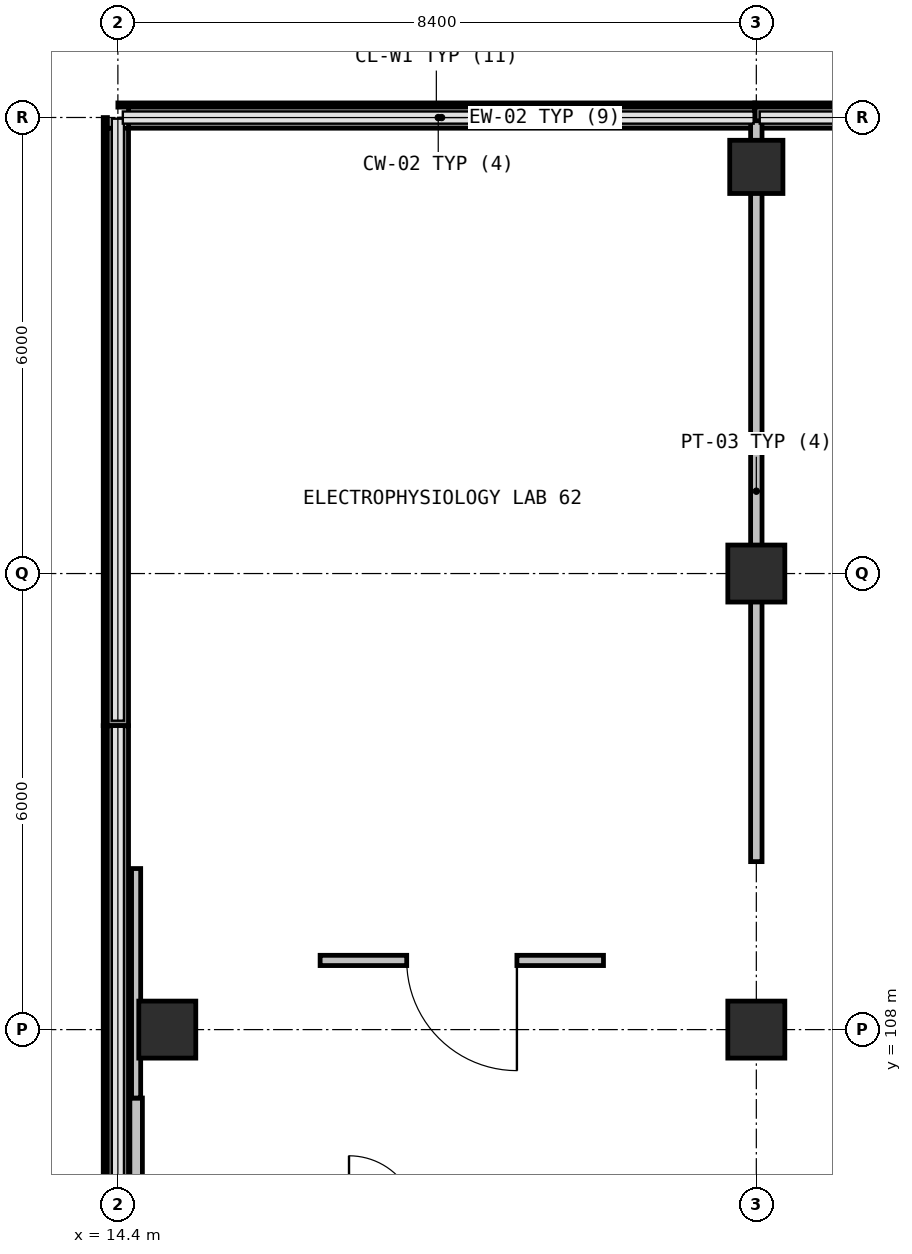
"""IFC4 building model, lengths in metres.
Left out: names, types, materials, properties, quantities, classifications, styles, units other than length and angle.
Written with IfcOpenShell. Run it as: python <this file> out.ifc"""

import sys

from ifc_helpers import new_model, si_unit, direction, frame, frame_2d, origin, origin_2d, place, context, subcontext, project, spatial, rectangle, extrude, element, fill, save


model = new_model("IFC4")
c1 = context("Model", 3, precision=1e-05, world=origin(), true_north=direction((0.0, 1.0)))
c2 = subcontext(c1, "Body", "Model", "MODEL_VIEW")
j1 = project(units=[si_unit("LENGTHUNIT", "METRE"), si_unit("PLANEANGLEUNIT", "RADIAN")], contexts=[c1])
p1 = place(None, origin())
s1 = spatial("IfcSite", under=j1, at=p1, CompositionType="ELEMENT")
p2 = place(p1, origin())
s2 = spatial("IfcBuilding", under=s1, at=p2, CompositionType="ELEMENT")
p3 = place(p2, frame((0.0, 0.0, 10.2)))
s3 = spatial("IfcBuildingStorey", under=s2, at=p3, CompositionType="ELEMENT", Elevation=10.2)
for number, where, z_axis, x_axis in (
    (1, (15.05, 108.0, 0.0), (0.0, 0.0, 1.0), (1.0, 0.0, 0.0)),
    (2, (22.8, 108.0, 0.0), (0.0, 0.0, 1.0), (1.0, 0.0, 0.0)),
    (3, (22.8, 114.0, 0.0), (0.0, 0.0, 1.0), (1.0, 0.0, 0.0)),
):
    element("IfcColumn", number, at=place(p3, frame(where, z_axis=z_axis, x_axis=x_axis)), inside=s3, PredefinedType="COLUMN", context=c2, shape_type="SweptSolid", body=[
        extrude(rectangle(XDim=0.75, YDim=0.75, at=origin_2d()), origin(), (0.0, 0.0, 1.0), 4.8),
    ])
p4 = place(p3, frame((22.8, 119.35, 0.0), z_axis=(0.0, 0.0, 1.0), x_axis=(1.0, 0.0, 0.0)))
e4 = element("IfcColumn", 4, at=p4, inside=s3, PredefinedType="COLUMN", context=c2, shape_type="SweptSolid", body=[
    extrude(rectangle(XDim=0.7, YDim=0.7, at=origin_2d()), origin(), (0.0, 0.0, 1.0), 4.8),
])
p5 = place(p3, frame((14.4, 104.001, 0.0), z_axis=(0.0, 0.0, 1.0), x_axis=(0.0, 1.0, 0.0)))
e5 = element("IfcWall", 5, at=p5, inside=s3, PredefinedType="SOLIDWALL", context=c2, shape_type="SweptSolid", body=[
    extrude(rectangle(XDim=7.996, YDim=0.28, at=frame_2d((3.998, 0.0))), origin(), (0.0, 0.0, 1.0), 0.94),
])
p6 = place(p3, frame((14.4, 112.001, 0.0), z_axis=(0.0, 0.0, 1.0), x_axis=(0.0, 1.0, 0.0)))
e6 = element("IfcWall", 6, at=p6, inside=s3, PredefinedType="SOLIDWALL", context=c2, shape_type="SweptSolid", body=[
    extrude(rectangle(XDim=7.858, YDim=0.28, at=frame_2d((3.929, 0.0))), origin(), (0.0, 0.0, 1.0), 0.94),
])
p7 = place(p3, frame((14.54, 119.999, 0.0), z_axis=(0.0, 0.0, 1.0), x_axis=(1.0, 0.0, 0.0)))
e7 = element("IfcWall", 7, at=p7, inside=s3, PredefinedType="SOLIDWALL", context=c2, shape_type="SweptSolid", body=[
    extrude(rectangle(XDim=8.238, YDim=0.28, at=frame_2d((4.119, 0.0))), origin(), (0.0, 0.0, 1.0), 0.94),
])
p8 = place(p3, frame((22.782, 119.999, 0.0), z_axis=(0.0, 0.0, 1.0), x_axis=(1.0, 0.0, 0.0)))
e8 = element("IfcWall", 8, at=p8, inside=s3, PredefinedType="SOLIDWALL", context=c2, shape_type="SweptSolid", body=[
    extrude(rectangle(XDim=8.376, YDim=0.28, at=frame_2d((4.188, 0.0))), origin(), (0.0, 0.0, 1.0), 0.94),
])
p9 = place(p3, frame((14.64, 107.1, 0.0), z_axis=(0.0, 0.0, 1.0), x_axis=(0.0, -1.0, 0.0)))
e9 = element("IfcWall", 9, at=p9, inside=s3, PredefinedType="PARTITIONING", context=c2, shape_type="SweptSolid", body=[
    extrude(rectangle(XDim=1.219, YDim=0.165, at=frame_2d((0.609, 0.0))), origin(), (0.0, 0.0, 1.0), 4.46),
])
p10 = place(p3, frame((22.8, 119.957, 0.0), z_axis=(0.0, 0.0, 1.0), x_axis=(0.0, -1.0, 0.0)))
e10 = element("IfcWall", 10, at=p10, inside=s3, PredefinedType="PARTITIONING", context=c2, shape_type="SweptSolid", body=[
    extrude(rectangle(XDim=9.747, YDim=0.15, at=frame_2d((4.874, 0.0))), origin(), (0.0, 0.0, 1.0), 3.81),
])
p11 = place(p3, frame((20.789, 108.91, 0.0), z_axis=(0.0, 0.0, 1.0), x_axis=(-1.0, 0.0, 0.0)))
e11 = element("IfcWall", 11, at=p11, inside=s3, PredefinedType="PARTITIONING", context=c2, shape_type="SweptSolid", body=[
    extrude(rectangle(XDim=3.728, YDim=0.135, at=frame_2d((1.864, 0.0))), origin(), (0.0, 0.0, 1.0), 4.46),
])
p12 = place(p11, frame((1.139, 0.0, 0.0)))
e12 = element("IfcOpeningElement", 12, at=p12, cuts=e11, PredefinedType="OPENING", context=c2, shape_type="SweptSolid", body=[
    extrude(rectangle(XDim=1.45, YDim=2.15, at=frame_2d((0.725, 1.075))), frame((0.0, 0.077, 0.0), z_axis=(0.0, -1.0, 0.0), x_axis=(1.0, 0.0, 0.0)), (0.0, 0.0, 1.0), 0.155),
])
p13 = place(p3, frame((14.64, 110.119, 0.0), z_axis=(0.0, 0.0, 1.0), x_axis=(0.0, -1.0, 0.0)))
e13 = element("IfcWall", 13, at=p13, inside=s3, PredefinedType="PARTITIONING", context=c2, shape_type="SweptSolid", body=[
    extrude(rectangle(XDim=3.019, YDim=0.12, at=frame_2d((1.509, 0.0))), origin(), (0.0, 0.0, 1.0), 4.46),
])
p14 = place(p12, origin())
e14 = element("IfcDoor", 14, at=p14, inside=s3, OperationType="SINGLE_SWING_LEFT", PredefinedType="DOOR", context=c2, shape_type="SweptSolid", body=[
    extrude(rectangle(XDim=1.45, YDim=2.15, at=frame_2d((0.725, 1.075))), frame((0.0, 0.025, 0.0), z_axis=(0.0, -1.0, 0.0), x_axis=(1.0, 0.0, 0.0)), (0.0, 0.0, 1.0), 0.05),
])
fill(e12, e14)
save(model, sys.argv[1])
